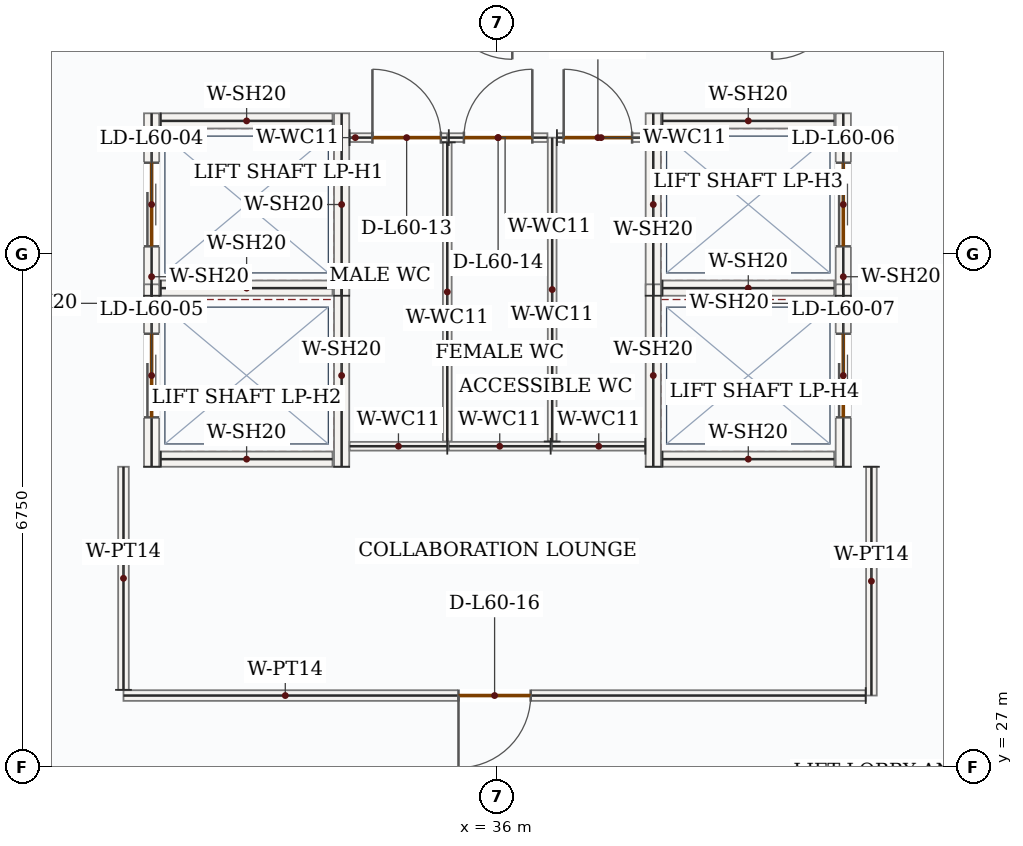
"""IFC4 building model, lengths in metres.
Left out: names, types, materials, properties, quantities, classifications, styles, units other than length and angle.
Written with IfcOpenShell. Run it as: python <this file> out.ifc"""

import sys

from ifc_helpers import new_model, si_unit, direction, frame, frame_2d, origin, place, context, subcontext, project, spatial, rectangle, extrude, source, transform, mapped, element, fill, save


model = new_model("IFC4")
c1 = context("Model", 3, precision=1e-05, world=origin(), true_north=direction((0.0, 1.0)))
c2 = subcontext(c1, "Body", "Model", "MODEL_VIEW")
j1 = project(units=[si_unit("LENGTHUNIT", "METRE"), si_unit("PLANEANGLEUNIT", "RADIAN")], contexts=[c1])
p1 = place(None, origin())
s1 = spatial("IfcSite", under=j1, at=p1, CompositionType="ELEMENT")
p2 = place(p1, origin())
s2 = spatial("IfcBuilding", under=s1, at=p2, CompositionType="ELEMENT")
p3 = place(p2, frame((0.0, 0.0, 254.1)))
s3 = spatial("IfcBuildingStorey", under=s2, at=p3, CompositionType="ELEMENT", Elevation=254.1)
p4 = place(p3, frame((31.45, 33.2, 0.0), z_axis=(0.0, 0.0, 1.0), x_axis=(0.0, 1.0, 0.0)))
e1 = element("IfcWall", 1, at=p4, inside=s3, PredefinedType="SOLIDWALL", context=c2, shape_type="SweptSolid", body=[
    extrude(rectangle(XDim=2.4, YDim=0.2, at=frame_2d((1.2, 0.0))), origin(), (0.0, 0.0, 1.0), 3.5),
])
p5 = place(p4, frame((0.65, 0.0, 0.0)))
e2 = element("IfcOpeningElement", 2, at=p5, cuts=e1, PredefinedType="OPENING", context=c2, shape_type="SweptSolid", body=[
    extrude(rectangle(XDim=1.1, YDim=2.15, at=frame_2d((0.55, 1.075))), frame((0.0, 0.11, 0.0), z_axis=(0.0, -1.0, 0.0), x_axis=(1.0, 0.0, 0.0)), (0.0, 0.0, 1.0), 0.22),
])
m1 = source(origin(), c2, "Body", "SweptSolid", [
    extrude(rectangle(XDim=2.4, YDim=0.2, at=frame_2d((1.2, 0.0))), origin(), (0.0, 0.0, 1.0), 3.5),
])
p6 = place(p3, frame((33.95, 33.2, 0.0), z_axis=(0.0, 0.0, 1.0), x_axis=(0.0, 1.0, 0.0)))
e3 = element("IfcWall", 3, at=p6, inside=s3, PredefinedType="SOLIDWALL", context=c2, shape_type="MappedRepresentation", body=[
    mapped(m1, transform((0.0, 0.0, 0.0), x_axis=(1.0, 0.0, 0.0), y_axis=(0.0, 1.0, 0.0), z_axis=(0.0, 0.0, 1.0), scale=1.0)),
])
m2 = source(origin(), c2, "Body", "SweptSolid", [
    extrude(rectangle(XDim=2.26, YDim=0.2, at=frame_2d((1.13, 0.0))), origin(), (0.0, 0.0, 1.0), 3.5),
])
for number, where, z_axis, x_axis in (
    (4, (31.57, 33.3, 0.0), (0.0, 0.0, 1.0), (1.0, 0.0, 0.0)),
    (5, (31.57, 35.5, 0.0), (0.0, 0.0, 1.0), (1.0, 0.0, 0.0)),
):
    element("IfcWall", number, at=place(p3, frame(where, z_axis=z_axis, x_axis=x_axis)), inside=s3, PredefinedType="SOLIDWALL", context=c2, shape_type="MappedRepresentation", body=[
        mapped(m2, transform((0.0, 0.0, 0.0), x_axis=(1.0, 0.0, 0.0), y_axis=(0.0, 1.0, 0.0), z_axis=(0.0, 0.0, 1.0), scale=1.0)),
    ])
p7 = place(p3, frame((31.45, 30.95, 0.0), z_axis=(0.0, 0.0, 1.0), x_axis=(0.0, 1.0, 0.0)))
e6 = element("IfcWall", 6, at=p7, inside=s3, PredefinedType="SOLIDWALL", context=c2, shape_type="SweptSolid", body=[
    extrude(rectangle(XDim=2.4, YDim=0.2, at=frame_2d((1.2, 0.0))), origin(), (0.0, 0.0, 1.0), 3.5),
])
p8 = place(p7, frame((0.65, 0.0, 0.0)))
e7 = element("IfcOpeningElement", 7, at=p8, cuts=e6, PredefinedType="OPENING", context=c2, shape_type="SweptSolid", body=[
    extrude(rectangle(XDim=1.1, YDim=2.15, at=frame_2d((0.55, 1.075))), frame((0.0, 0.11, 0.0), z_axis=(0.0, -1.0, 0.0), x_axis=(1.0, 0.0, 0.0)), (0.0, 0.0, 1.0), 0.22),
])
p9 = place(p3, frame((33.95, 30.95, 0.0), z_axis=(0.0, 0.0, 1.0), x_axis=(0.0, 1.0, 0.0)))
e8 = element("IfcWall", 8, at=p9, inside=s3, PredefinedType="SOLIDWALL", context=c2, shape_type="MappedRepresentation", body=[
    mapped(m1, transform((0.0, 0.0, 0.0), x_axis=(1.0, 0.0, 0.0), y_axis=(0.0, 1.0, 0.0), z_axis=(0.0, 0.0, 1.0), scale=1.0)),
])
p10 = place(p3, frame((31.57, 31.05, 0.0), z_axis=(0.0, 0.0, 1.0), x_axis=(1.0, 0.0, 0.0)))
e9 = element("IfcWall", 9, at=p10, inside=s3, PredefinedType="SOLIDWALL", context=c2, shape_type="MappedRepresentation", body=[
    mapped(m2, transform((0.0, 0.0, 0.0), x_axis=(1.0, 0.0, 0.0), y_axis=(0.0, 1.0, 0.0), z_axis=(0.0, 0.0, 1.0), scale=1.0)),
])
p11 = place(p3, frame((38.05, 33.2, 0.0), z_axis=(0.0, 0.0, 1.0), x_axis=(0.0, 1.0, 0.0)))
e10 = element("IfcWall", 10, at=p11, inside=s3, PredefinedType="SOLIDWALL", context=c2, shape_type="MappedRepresentation", body=[
    mapped(m1, transform((0.0, 0.0, 0.0), x_axis=(1.0, 0.0, 0.0), y_axis=(0.0, 1.0, 0.0), z_axis=(0.0, 0.0, 1.0), scale=1.0)),
])
p12 = place(p3, frame((40.55, 33.2, 0.0), z_axis=(0.0, 0.0, 1.0), x_axis=(0.0, 1.0, 0.0)))
e11 = element("IfcWall", 11, at=p12, inside=s3, PredefinedType="SOLIDWALL", context=c2, shape_type="SweptSolid", body=[
    extrude(rectangle(XDim=2.4, YDim=0.2, at=frame_2d((1.2, 0.0))), origin(), (0.0, 0.0, 1.0), 3.5),
])
p13 = place(p12, frame((0.65, 0.0, 0.0)))
e12 = element("IfcOpeningElement", 12, at=p13, cuts=e11, PredefinedType="OPENING", context=c2, shape_type="SweptSolid", body=[
    extrude(rectangle(XDim=1.1, YDim=2.15, at=frame_2d((0.55, 1.075))), frame((0.0, 0.11, 0.0), z_axis=(0.0, -1.0, 0.0), x_axis=(1.0, 0.0, 0.0)), (0.0, 0.0, 1.0), 0.22),
])
for number, where, z_axis, x_axis in (
    (13, (38.17, 33.3, 0.0), (0.0, 0.0, 1.0), (1.0, 0.0, 0.0)),
    (14, (38.17, 35.5, 0.0), (0.0, 0.0, 1.0), (1.0, 0.0, 0.0)),
):
    element("IfcWall", number, at=place(p3, frame(where, z_axis=z_axis, x_axis=x_axis)), inside=s3, PredefinedType="SOLIDWALL", context=c2, shape_type="MappedRepresentation", body=[
        mapped(m2, transform((0.0, 0.0, 0.0), x_axis=(1.0, 0.0, 0.0), y_axis=(0.0, 1.0, 0.0), z_axis=(0.0, 0.0, 1.0), scale=1.0)),
    ])
p14 = place(p3, frame((38.05, 30.95, 0.0), z_axis=(0.0, 0.0, 1.0), x_axis=(0.0, 1.0, 0.0)))
e15 = element("IfcWall", 15, at=p14, inside=s3, PredefinedType="SOLIDWALL", context=c2, shape_type="MappedRepresentation", body=[
    mapped(m1, transform((0.0, 0.0, 0.0), x_axis=(1.0, 0.0, 0.0), y_axis=(0.0, 1.0, 0.0), z_axis=(0.0, 0.0, 1.0), scale=1.0)),
])
p15 = place(p3, frame((40.55, 30.95, 0.0), z_axis=(0.0, 0.0, 1.0), x_axis=(0.0, 1.0, 0.0)))
e16 = element("IfcWall", 16, at=p15, inside=s3, PredefinedType="SOLIDWALL", context=c2, shape_type="SweptSolid", body=[
    extrude(rectangle(XDim=2.4, YDim=0.2, at=frame_2d((1.2, 0.0))), origin(), (0.0, 0.0, 1.0), 3.5),
])
p16 = place(p15, frame((0.65, 0.0, 0.0)))
e17 = element("IfcOpeningElement", 17, at=p16, cuts=e16, PredefinedType="OPENING", context=c2, shape_type="SweptSolid", body=[
    extrude(rectangle(XDim=1.1, YDim=2.15, at=frame_2d((0.55, 1.075))), frame((0.0, 0.11, 0.0), z_axis=(0.0, -1.0, 0.0), x_axis=(1.0, 0.0, 0.0)), (0.0, 0.0, 1.0), 0.22),
])
p17 = place(p3, frame((38.17, 31.05, 0.0), z_axis=(0.0, 0.0, 1.0), x_axis=(1.0, 0.0, 0.0)))
e18 = element("IfcWall", 18, at=p17, inside=s3, PredefinedType="SOLIDWALL", context=c2, shape_type="MappedRepresentation", body=[
    mapped(m2, transform((0.0, 0.0, 0.0), x_axis=(1.0, 0.0, 0.0), y_axis=(0.0, 1.0, 0.0), z_axis=(0.0, 0.0, 1.0), scale=1.0)),
])
m3 = source(origin(), c2, "Body", "SweptSolid", [
    extrude(rectangle(XDim=1.225, YDim=0.115, at=frame_2d((0.613, 0.0))), origin(), (0.0, 0.0, 1.0), 3.5),
])
p18 = place(p3, frame((37.945, 31.22, 0.0), z_axis=(0.0, 0.0, 1.0), x_axis=(-1.0, 0.0, 0.0)))
e19 = element("IfcWall", 19, at=p18, inside=s3, PredefinedType="PARTITIONING", context=c2, shape_type="MappedRepresentation", body=[
    mapped(m3, transform((0.0, 0.0, 0.0), x_axis=(1.0, 0.0, 0.0), y_axis=(0.0, 1.0, 0.0), z_axis=(0.0, 0.0, 1.0), scale=1.0)),
])
m4 = source(origin(), c2, "Body", "SweptSolid", [
    extrude(rectangle(XDim=3.998, YDim=0.115, at=frame_2d((1.999, 0.0))), origin(), (0.0, 0.0, 1.0), 3.5),
])
p19 = place(p3, frame((36.72, 31.282, 0.0), z_axis=(0.0, 0.0, 1.0), x_axis=(0.0, 1.0, 0.0)))
e20 = element("IfcWall", 20, at=p19, inside=s3, PredefinedType="PARTITIONING", context=c2, shape_type="MappedRepresentation", body=[
    mapped(m4, transform((0.0, 0.0, 0.0), x_axis=(1.0, 0.0, 0.0), y_axis=(0.0, 1.0, 0.0), z_axis=(0.0, 0.0, 1.0), scale=1.0)),
])
p20 = place(p3, frame((36.782, 35.28, 0.0), z_axis=(0.0, 0.0, 1.0), x_axis=(1.0, 0.0, 0.0)))
e21 = element("IfcWall", 21, at=p20, inside=s3, PredefinedType="PARTITIONING", context=c2, shape_type="SweptSolid", body=[
    extrude(rectangle(XDim=1.163, YDim=0.115, at=frame_2d((0.581, 0.0))), origin(), (0.0, 0.0, 1.0), 3.5),
])
p21 = place(p20, frame((0.089, 0.0, 0.0)))
e22 = element("IfcOpeningElement", 22, at=p21, cuts=e21, PredefinedType="OPENING", context=c2, shape_type="SweptSolid", body=[
    extrude(rectangle(XDim=0.9, YDim=2.1, at=frame_2d((0.45, 1.05))), frame((0.0, 0.067, 0.0), z_axis=(0.0, -1.0, 0.0), x_axis=(1.0, 0.0, 0.0)), (0.0, 0.0, 1.0), 0.135),
])
m5 = source(origin(), c2, "Body", "SweptSolid", [
    extrude(rectangle(XDim=1.285, YDim=0.115, at=frame_2d((0.643, 0.0))), origin(), (0.0, 0.0, 1.0), 3.5),
])
p22 = place(p3, frame((35.34, 31.22, 0.0), z_axis=(0.0, 0.0, 1.0), x_axis=(-1.0, 0.0, 0.0)))
e23 = element("IfcWall", 23, at=p22, inside=s3, PredefinedType="PARTITIONING", context=c2, shape_type="MappedRepresentation", body=[
    mapped(m5, transform((0.0, 0.0, 0.0), x_axis=(1.0, 0.0, 0.0), y_axis=(0.0, 1.0, 0.0), z_axis=(0.0, 0.0, 1.0), scale=1.0)),
])
p23 = place(p3, frame((34.055, 35.28, 0.0), z_axis=(0.0, 0.0, 1.0), x_axis=(1.0, 0.0, 0.0)))
e24 = element("IfcWall", 24, at=p23, inside=s3, PredefinedType="PARTITIONING", context=c2, shape_type="SweptSolid", body=[
    extrude(rectangle(XDim=1.285, YDim=0.115, at=frame_2d((0.643, 0.0))), origin(), (0.0, 0.0, 1.0), 3.5),
])
p24 = place(p23, frame((0.3, 0.0, 0.0)))
e25 = element("IfcOpeningElement", 25, at=p24, cuts=e24, PredefinedType="OPENING", context=c2, shape_type="SweptSolid", body=[
    extrude(rectangle(XDim=0.9, YDim=2.1, at=frame_2d((0.45, 1.05))), frame((0.0, 0.067, 0.0), z_axis=(0.0, -1.0, 0.0), x_axis=(1.0, 0.0, 0.0)), (0.0, 0.0, 1.0), 0.135),
])
m6 = source(origin(), c2, "Body", "SweptSolid", [
    extrude(rectangle(XDim=3.935, YDim=0.115, at=frame_2d((1.968, 0.0))), origin(), (0.0, 0.0, 1.0), 3.5),
])
p25 = place(p3, frame((35.34, 35.218, 0.0), z_axis=(0.0, 0.0, 1.0), x_axis=(0.0, -1.0, 0.0)))
e26 = element("IfcWall", 26, at=p25, inside=s3, PredefinedType="PARTITIONING", context=c2, shape_type="MappedRepresentation", body=[
    mapped(m6, transform((0.0, 0.0, 0.0), x_axis=(1.0, 0.0, 0.0), y_axis=(0.0, 1.0, 0.0), z_axis=(0.0, 0.0, 1.0), scale=1.0)),
])
m7 = source(origin(), c2, "Body", "SweptSolid", [
    extrude(rectangle(XDim=1.34, YDim=0.115, at=frame_2d((0.67, 0.0))), origin(), (0.0, 0.0, 1.0), 3.5),
])
p26 = place(p3, frame((36.7, 31.22, 0.0), z_axis=(0.0, 0.0, 1.0), x_axis=(-1.0, 0.0, 0.0)))
e27 = element("IfcWall", 27, at=p26, inside=s3, PredefinedType="PARTITIONING", context=c2, shape_type="MappedRepresentation", body=[
    mapped(m7, transform((0.0, 0.0, 0.0), x_axis=(1.0, 0.0, 0.0), y_axis=(0.0, 1.0, 0.0), z_axis=(0.0, 0.0, 1.0), scale=1.0)),
])
p27 = place(p3, frame((35.36, 35.28, 0.0), z_axis=(0.0, 0.0, 1.0), x_axis=(1.0, 0.0, 0.0)))
e28 = element("IfcWall", 28, at=p27, inside=s3, PredefinedType="PARTITIONING", context=c2, shape_type="SweptSolid", body=[
    extrude(rectangle(XDim=1.297, YDim=0.115, at=frame_2d((0.649, 0.0))), origin(), (0.0, 0.0, 1.0), 3.5),
])
p28 = place(p27, frame((0.199, 0.0, 0.0)))
e29 = element("IfcOpeningElement", 29, at=p28, cuts=e28, PredefinedType="OPENING", context=c2, shape_type="SweptSolid", body=[
    extrude(rectangle(XDim=0.9, YDim=2.1, at=frame_2d((0.45, 1.05))), frame((0.0, 0.067, 0.0), z_axis=(0.0, -1.0, 0.0), x_axis=(1.0, 0.0, 0.0)), (0.0, 0.0, 1.0), 0.135),
])
m8 = source(origin(), c2, "Body", "SweptSolid", [
    extrude(rectangle(XDim=3.01, YDim=0.14, at=frame_2d((1.505, 0.0))), origin(), (0.0, 0.0, 1.0), 3.5),
])
p29 = place(p3, frame((40.92, 30.95, 0.0), z_axis=(0.0, 0.0, 1.0), x_axis=(0.0, -1.0, 0.0)))
e30 = element("IfcWall", 30, at=p29, inside=s3, PredefinedType="PARTITIONING", context=c2, shape_type="MappedRepresentation", body=[
    mapped(m8, transform((0.0, 0.0, 0.0), x_axis=(1.0, 0.0, 0.0), y_axis=(0.0, 1.0, 0.0), z_axis=(0.0, 0.0, 1.0), scale=1.0)),
])
p30 = place(p3, frame((40.845, 27.94, 0.0), z_axis=(0.0, 0.0, 1.0), x_axis=(-1.0, 0.0, 0.0)))
e31 = element("IfcWall", 31, at=p30, inside=s3, PredefinedType="PARTITIONING", context=c2, shape_type="SweptSolid", body=[
    extrude(rectangle(XDim=9.765, YDim=0.14, at=frame_2d((4.882, 0.0))), origin(), (0.0, 0.0, 1.0), 3.5),
])
p31 = place(p30, frame((4.407, 0.0, 0.0)))
e32 = element("IfcOpeningElement", 32, at=p31, cuts=e31, PredefinedType="OPENING", context=c2, shape_type="SweptSolid", body=[
    extrude(rectangle(XDim=0.95, YDim=2.15, at=frame_2d((0.475, 1.075))), frame((0.0, 0.08, 0.0), z_axis=(0.0, -1.0, 0.0), x_axis=(1.0, 0.0, 0.0)), (0.0, 0.0, 1.0), 0.16),
])
m9 = source(origin(), c2, "Body", "SweptSolid", [
    extrude(rectangle(XDim=2.935, YDim=0.14, at=frame_2d((1.468, 0.0))), origin(), (0.0, 0.0, 1.0), 3.5),
])
p32 = place(p3, frame((31.08, 28.015, 0.0), z_axis=(0.0, 0.0, 1.0), x_axis=(0.0, 1.0, 0.0)))
e33 = element("IfcWall", 33, at=p32, inside=s3, PredefinedType="PARTITIONING", context=c2, shape_type="MappedRepresentation", body=[
    mapped(m9, transform((0.0, 0.0, 0.0), x_axis=(1.0, 0.0, 0.0), y_axis=(0.0, 1.0, 0.0), z_axis=(0.0, 0.0, 1.0), scale=1.0)),
])
m10 = source(origin(), c2, "Body", "SweptSolid", [
    extrude(rectangle(XDim=1.1, YDim=2.15, at=frame_2d((0.55, 1.075))), frame((0.0, 0.025, 0.0), z_axis=(0.0, -1.0, 0.0), x_axis=(1.0, 0.0, 0.0)), (0.0, 0.0, 1.0), 0.05),
])
p33 = place(p5, origin())
e34 = element("IfcDoor", 34, at=p33, inside=s3, OperationType="DOUBLE_DOOR_SLIDING", PredefinedType="DOOR", context=c2, shape_type="MappedRepresentation", body=[
    mapped(m10, transform((0.0, 0.0, 0.0), x_axis=(1.0, 0.0, 0.0), y_axis=(0.0, 1.0, 0.0), z_axis=(0.0, 0.0, 1.0), scale=1.0)),
])
fill(e2, e34)
p34 = place(p8, origin())
e35 = element("IfcDoor", 35, at=p34, inside=s3, OperationType="DOUBLE_DOOR_SLIDING", PredefinedType="DOOR", context=c2, shape_type="MappedRepresentation", body=[
    mapped(m10, transform((0.0, 0.0, 0.0), x_axis=(1.0, 0.0, 0.0), y_axis=(0.0, 1.0, 0.0), z_axis=(0.0, 0.0, 1.0), scale=1.0)),
])
fill(e7, e35)
p35 = place(p13, origin())
e36 = element("IfcDoor", 36, at=p35, inside=s3, OperationType="DOUBLE_DOOR_SLIDING", PredefinedType="DOOR", context=c2, shape_type="MappedRepresentation", body=[
    mapped(m10, transform((0.0, 0.0, 0.0), x_axis=(1.0, 0.0, 0.0), y_axis=(0.0, 1.0, 0.0), z_axis=(0.0, 0.0, 1.0), scale=1.0)),
])
fill(e12, e36)
p36 = place(p16, origin())
e37 = element("IfcDoor", 37, at=p36, inside=s3, OperationType="DOUBLE_DOOR_SLIDING", PredefinedType="DOOR", context=c2, shape_type="MappedRepresentation", body=[
    mapped(m10, transform((0.0, 0.0, 0.0), x_axis=(1.0, 0.0, 0.0), y_axis=(0.0, 1.0, 0.0), z_axis=(0.0, 0.0, 1.0), scale=1.0)),
])
fill(e17, e37)
m11 = source(origin(), c2, "Body", "SweptSolid", [
    extrude(rectangle(XDim=0.9, YDim=2.1, at=frame_2d((0.45, 1.05))), frame((0.0, 0.025, 0.0), z_axis=(0.0, -1.0, 0.0), x_axis=(1.0, 0.0, 0.0)), (0.0, 0.0, 1.0), 0.05),
])
p37 = place(p24, origin())
e38 = element("IfcDoor", 38, at=p37, inside=s3, OperationType="SINGLE_SWING_LEFT", PredefinedType="DOOR", context=c2, shape_type="MappedRepresentation", body=[
    mapped(m11, transform((0.0, 0.0, 0.0), x_axis=(1.0, 0.0, 0.0), y_axis=(0.0, 1.0, 0.0), z_axis=(0.0, 0.0, 1.0), scale=1.0)),
])
fill(e25, e38)
p38 = place(p28, origin())
e39 = element("IfcDoor", 39, at=p38, inside=s3, OperationType="SINGLE_SWING_RIGHT", PredefinedType="DOOR", context=c2, shape_type="MappedRepresentation", body=[
    mapped(m11, transform((0.0, 0.0, 0.0), x_axis=(1.0, 0.0, 0.0), y_axis=(0.0, 1.0, 0.0), z_axis=(0.0, 0.0, 1.0), scale=1.0)),
])
fill(e29, e39)
p39 = place(p21, origin())
e40 = element("IfcDoor", 40, at=p39, inside=s3, OperationType="SINGLE_SWING_LEFT", PredefinedType="DOOR", context=c2, shape_type="MappedRepresentation", body=[
    mapped(m11, transform((0.0, 0.0, 0.0), x_axis=(1.0, 0.0, 0.0), y_axis=(0.0, 1.0, 0.0), z_axis=(0.0, 0.0, 1.0), scale=1.0)),
])
fill(e22, e40)
m12 = source(origin(), c2, "Body", "SweptSolid", [
    extrude(rectangle(XDim=0.95, YDim=2.15, at=frame_2d((0.475, 1.075))), frame((0.0, 0.025, 0.0), z_axis=(0.0, -1.0, 0.0), x_axis=(1.0, 0.0, 0.0)), (0.0, 0.0, 1.0), 0.05),
])
p40 = place(p31, origin())
e41 = element("IfcDoor", 41, at=p40, inside=s3, OperationType="SINGLE_SWING_RIGHT", PredefinedType="DOOR", context=c2, shape_type="MappedRepresentation", body=[
    mapped(m12, transform((0.0, 0.0, 0.0), x_axis=(1.0, 0.0, 0.0), y_axis=(0.0, 1.0, 0.0), z_axis=(0.0, 0.0, 1.0), scale=1.0)),
])
fill(e32, e41)
save(model, sys.argv[1])
